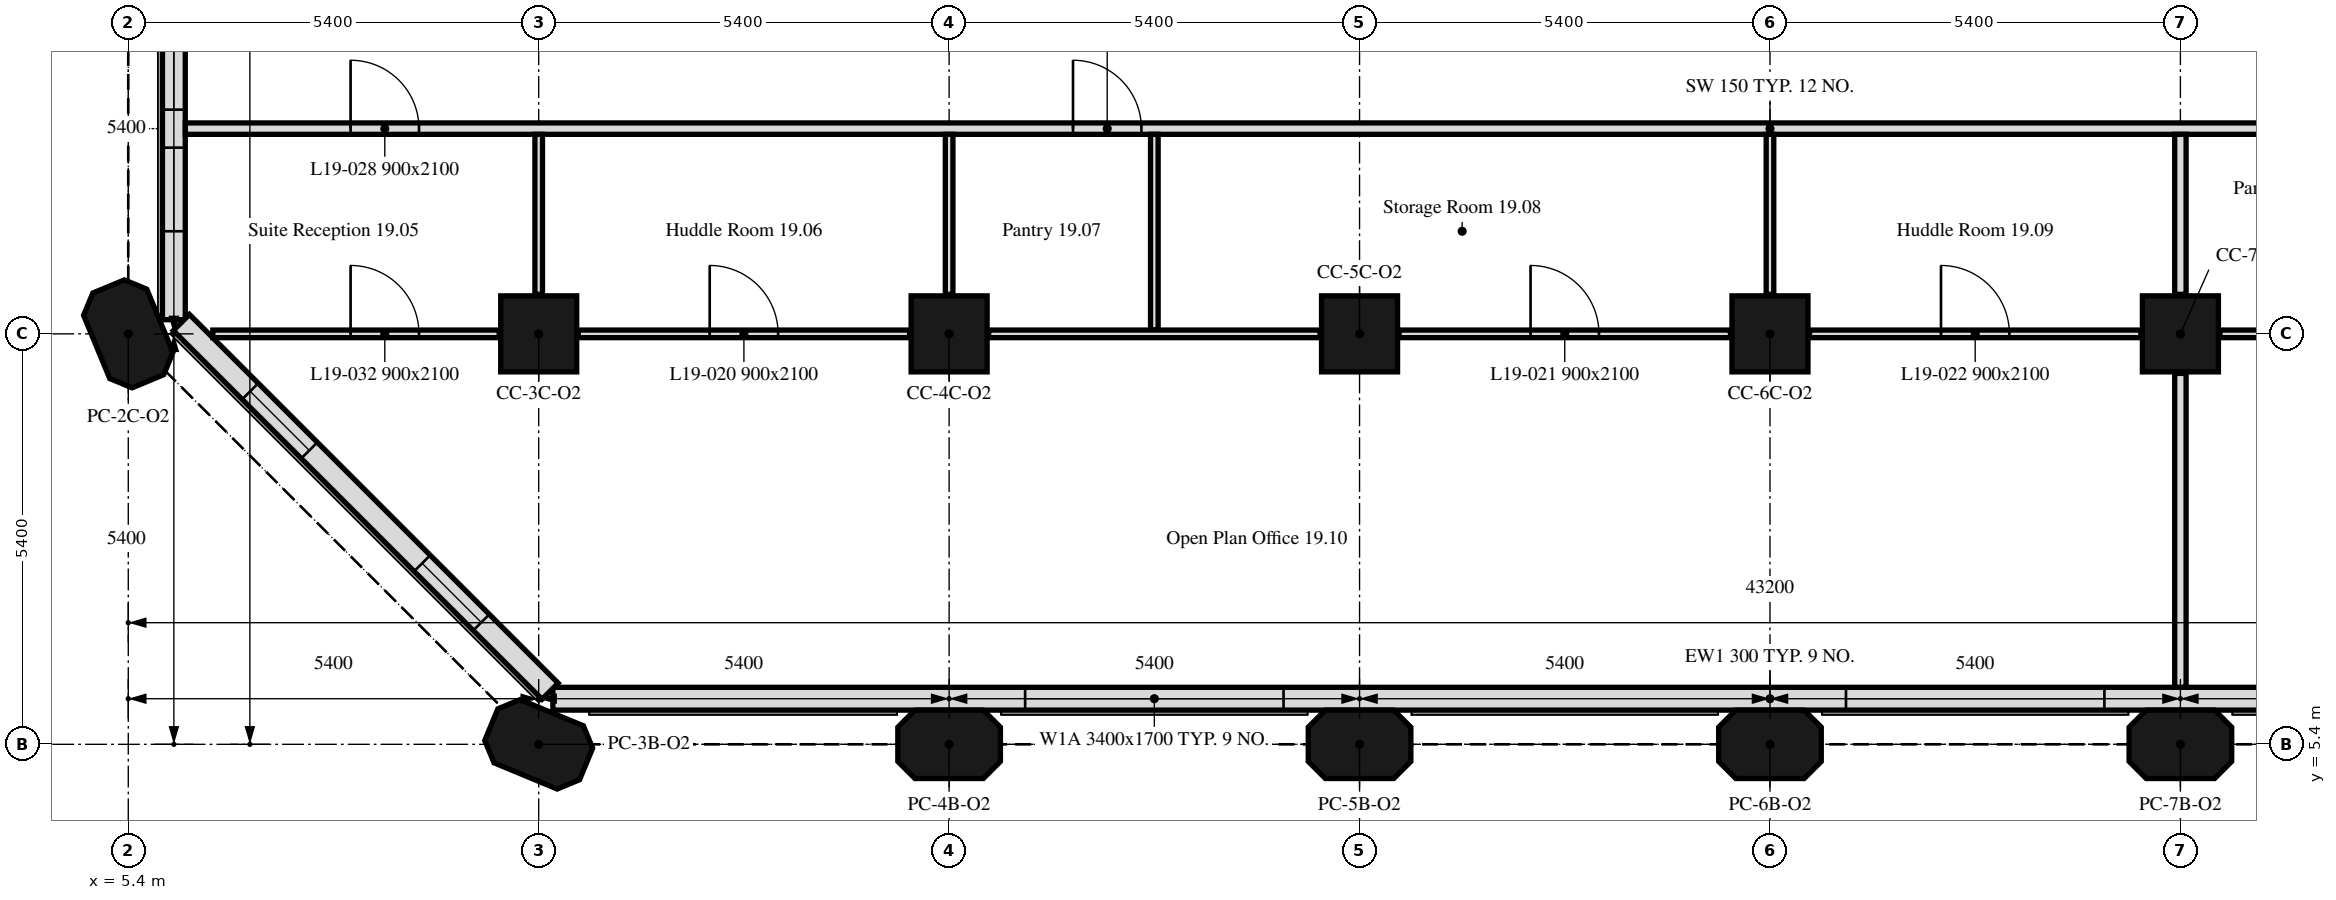
"""IFC4 building model, lengths in metres.
Left out: names, types, materials, properties, quantities, classifications, styles, units other than length and angle.
Written with IfcOpenShell. Run it as: python <this file> out.ifc"""

import sys

from ifc_helpers import new_model, si_unit, direction, frame, frame_2d, origin, origin_2d, place, context, subcontext, project, spatial, polyline, rectangle, outline, extrude, element, fill, save


model = new_model("IFC4")
c1 = context("Model", 3, precision=1e-05, world=origin(), true_north=direction((0.0, 1.0)))
c2 = subcontext(c1, "Body", "Model", "MODEL_VIEW")
j1 = project(units=[si_unit("LENGTHUNIT", "METRE"), si_unit("PLANEANGLEUNIT", "RADIAN")], contexts=[c1])
p1 = place(None, origin())
s1 = spatial("IfcSite", under=j1, at=p1, CompositionType="ELEMENT")
p2 = place(p1, origin())
s2 = spatial("IfcBuilding", under=s1, at=p2, CompositionType="ELEMENT")
p3 = place(p2, frame((0.0, 0.0, 84.0)))
s3 = spatial("IfcBuildingStorey", under=s2, at=p3, CompositionType="ELEMENT", Elevation=84.0)
for number, where, z_axis, x_axis in (
    (1, (10.8, 5.4, 0.0), (0.0, 0.0, 1.0), (-0.924, 0.383, 0.0)),
    (2, (16.2, 5.4, 0.0), (0.0, 0.0, 1.0), (1.0, 0.0, 0.0)),
    (3, (21.6, 5.4, 0.0), (0.0, 0.0, 1.0), (1.0, 0.0, 0.0)),
    (4, (27.0, 5.4, 0.0), (0.0, 0.0, 1.0), (1.0, 0.0, 0.0)),
    (5, (32.4, 5.4, 0.0), (0.0, 0.0, 1.0), (1.0, 0.0, 0.0)),
    (6, (5.4, 10.8, 0.0), (0.0, 0.0, 1.0), (-0.383, 0.924, 0.0)),
):
    element("IfcColumn", number, at=place(p3, frame(where, z_axis=z_axis, x_axis=x_axis)), inside=s3, PredefinedType="COLUMN", context=c2, shape_type="SweptSolid", body=[
        extrude(outline(polyline([(-0.45, -0.45), (0.45, -0.45), (0.675, -0.225), (0.675, 0.225), (0.45, 0.45), (-0.45, 0.45), (-0.675, 0.225), (-0.675, -0.225), (-0.45, -0.45)])), origin(), (0.0, 0.0, 1.0), 3.5),
    ])
for number, where, z_axis, x_axis in (
    (7, (10.8, 10.8, 0.0), (0.0, 0.0, 1.0), (1.0, 0.0, 0.0)),
    (8, (16.2, 10.8, 0.0), (0.0, 0.0, 1.0), (1.0, 0.0, 0.0)),
    (9, (21.6, 10.8, 0.0), (0.0, 0.0, 1.0), (1.0, 0.0, 0.0)),
    (10, (27.0, 10.8, 0.0), (0.0, 0.0, 1.0), (1.0, 0.0, 0.0)),
    (11, (32.4, 10.8, 0.0), (0.0, 0.0, 1.0), (1.0, 0.0, 0.0)),
):
    element("IfcColumn", number, at=place(p3, frame(where, z_axis=z_axis, x_axis=x_axis)), inside=s3, PredefinedType="COLUMN", context=c2, shape_type="SweptSolid", body=[
        extrude(rectangle(XDim=1.0, YDim=1.0, at=origin_2d()), origin(), (0.0, 0.0, 1.0), 3.5),
    ])
p4 = place(p3, frame((10.986, 6.0, 0.0), z_axis=(0.0, 0.0, 1.0), x_axis=(1.0, 0.0, 0.0)))
e12 = element("IfcWall", 12, at=p4, inside=s3, PredefinedType="SOLIDWALL", context=c2, shape_type="SweptSolid", body=[
    extrude(rectangle(XDim=32.027, YDim=0.3, at=frame_2d((16.014, 0.0))), origin(), (0.0, 0.0, 1.0), 3.5),
])
p5 = place(p4, frame((6.214, 0.0, 0.9)))
e13 = element("IfcOpeningElement", 13, at=p5, cuts=e12, PredefinedType="OPENING", context=c2, shape_type="SweptSolid", body=[
    extrude(rectangle(XDim=3.4, YDim=1.7, at=frame_2d((1.7, 0.85))), frame((0.0, 0.16, 0.0), z_axis=(0.0, -1.0, 0.0), x_axis=(1.0, 0.0, 0.0)), (0.0, 0.0, 1.0), 0.32),
])
p6 = place(p4, frame((17.014, 0.0, 0.9)))
e14 = element("IfcOpeningElement", 14, at=p6, cuts=e12, PredefinedType="OPENING", context=c2, shape_type="SweptSolid", body=[
    extrude(rectangle(XDim=3.4, YDim=1.7, at=frame_2d((1.7, 0.85))), frame((0.0, 0.16, 0.0), z_axis=(0.0, -1.0, 0.0), x_axis=(1.0, 0.0, 0.0)), (0.0, 0.0, 1.0), 0.32),
])
p7 = place(p4, frame((27.814, 0.0, 0.9)))
e15 = element("IfcOpeningElement", 15, at=p7, cuts=e12, PredefinedType="OPENING", context=c2, shape_type="SweptSolid", body=[
    extrude(rectangle(XDim=3.4, YDim=1.7, at=frame_2d((1.7, 0.85))), frame((0.0, 0.16, 0.0), z_axis=(0.0, -1.0, 0.0), x_axis=(1.0, 0.0, 0.0)), (0.0, 0.0, 1.0), 0.32),
])
p8 = place(p3, frame((6.0, 16.2, 0.0), z_axis=(0.0, 0.0, 1.0), x_axis=(0.0, -1.0, 0.0)))
e16 = element("IfcWall", 16, at=p8, inside=s3, PredefinedType="SOLIDWALL", context=c2, shape_type="SweptSolid", body=[
    extrude(rectangle(XDim=5.214, YDim=0.3, at=frame_2d((2.607, 0.0))), origin(), (0.0, 0.0, 1.0), 3.5),
])
p9 = place(p8, frame((1.35, 0.0, 0.9)))
e17 = element("IfcOpeningElement", 17, at=p9, cuts=e16, PredefinedType="OPENING", context=c2, shape_type="SweptSolid", body=[
    extrude(rectangle(XDim=1.1, YDim=1.7, at=frame_2d((0.55, 0.85))), frame((0.0, 0.16, 0.0), z_axis=(0.0, -1.0, 0.0), x_axis=(1.0, 0.0, 0.0)), (0.0, 0.0, 1.0), 0.32),
])
p10 = place(p8, frame((2.95, 0.0, 0.9)))
e18 = element("IfcOpeningElement", 18, at=p10, cuts=e16, PredefinedType="OPENING", context=c2, shape_type="SweptSolid", body=[
    extrude(rectangle(XDim=1.1, YDim=1.7, at=frame_2d((0.55, 0.85))), frame((0.0, 0.16, 0.0), z_axis=(0.0, -1.0, 0.0), x_axis=(1.0, 0.0, 0.0)), (0.0, 0.0, 1.0), 0.32),
])
p11 = place(p3, frame((6.099, 10.949, 0.0), z_axis=(0.0, 0.0, 1.0), x_axis=(0.707106781187, -0.707106781187, 0.0)))
e19 = element("IfcWall", 19, at=p11, inside=s3, PredefinedType="SOLIDWALL", context=c2, shape_type="SweptSolid", body=[
    extrude(rectangle(XDim=6.86, YDim=0.3, at=frame_2d((3.43, 0.0))), origin(), (0.0, 0.0, 1.0), 3.5),
])
p12 = place(p11, frame((1.28, 0.0, 0.9)))
e20 = element("IfcOpeningElement", 20, at=p12, cuts=e19, PredefinedType="OPENING", context=c2, shape_type="SweptSolid", body=[
    extrude(rectangle(XDim=1.1, YDim=1.7, at=frame_2d((0.55, 0.85))), frame((0.0, 0.16, 0.0), z_axis=(0.0, -1.0, 0.0), x_axis=(1.0, 0.0, 0.0)), (0.0, 0.0, 1.0), 0.32),
])
p13 = place(p11, frame((4.48, 0.0, 0.9)))
e21 = element("IfcOpeningElement", 21, at=p13, cuts=e19, PredefinedType="OPENING", context=c2, shape_type="SweptSolid", body=[
    extrude(rectangle(XDim=1.1, YDim=1.7, at=frame_2d((0.55, 0.85))), frame((0.0, 0.16, 0.0), z_axis=(0.0, -1.0, 0.0), x_axis=(1.0, 0.0, 0.0)), (0.0, 0.0, 1.0), 0.32),
])
p14 = place(p3, frame((6.151, 13.5, 0.0), z_axis=(0.0, 0.0, 1.0), x_axis=(1.0, 0.0, 0.0)))
e22 = element("IfcWall", 22, at=p14, inside=s3, PredefinedType="PARTITIONING", context=c2, shape_type="SweptSolid", body=[
    extrude(rectangle(XDim=41.698, YDim=0.15, at=frame_2d((20.849, 0.0))), origin(), (0.0, 0.0, 1.0), 3.5),
])
p15 = place(p14, frame((11.679, 0.0, 0.0)))
e23 = element("IfcOpeningElement", 23, at=p15, cuts=e22, PredefinedType="OPENING", context=c2, shape_type="SweptSolid", body=[
    extrude(rectangle(XDim=0.9, YDim=2.1, at=frame_2d((0.45, 1.05))), frame((0.0, 0.075, 0.0), z_axis=(0.0, -1.0, 0.0), x_axis=(1.0, 0.0, 0.0)), (0.0, 0.0, 1.0), 0.15),
])
p16 = place(p14, frame((27.879, 0.0, 0.0)))
e24 = element("IfcOpeningElement", 24, at=p16, cuts=e22, PredefinedType="OPENING", context=c2, shape_type="SweptSolid", body=[
    extrude(rectangle(XDim=0.9, YDim=2.1, at=frame_2d((0.45, 1.05))), frame((0.0, 0.075, 0.0), z_axis=(0.0, -1.0, 0.0), x_axis=(1.0, 0.0, 0.0)), (0.0, 0.0, 1.0), 0.15),
])
p17 = place(p14, frame((29.119, 0.0, 0.0)))
e25 = element("IfcOpeningElement", 25, at=p17, cuts=e22, PredefinedType="OPENING", context=c2, shape_type="SweptSolid", body=[
    extrude(rectangle(XDim=0.9, YDim=2.1, at=frame_2d((0.45, 1.05))), frame((0.0, 0.075, 0.0), z_axis=(0.0, -1.0, 0.0), x_axis=(1.0, 0.0, 0.0)), (0.0, 0.0, 1.0), 0.15),
])
p18 = place(p14, frame((33.279, 0.0, 0.0)))
e26 = element("IfcOpeningElement", 26, at=p18, cuts=e22, PredefinedType="OPENING", context=c2, shape_type="SweptSolid", body=[
    extrude(rectangle(XDim=0.9, YDim=2.1, at=frame_2d((0.45, 1.05))), frame((0.0, 0.075, 0.0), z_axis=(0.0, -1.0, 0.0), x_axis=(1.0, 0.0, 0.0)), (0.0, 0.0, 1.0), 0.15),
])
p19 = place(p14, frame((2.174, 0.0, 0.0)))
e27 = element("IfcOpeningElement", 27, at=p19, cuts=e22, PredefinedType="OPENING", context=c2, shape_type="SweptSolid", body=[
    extrude(rectangle(XDim=0.9, YDim=2.1, at=frame_2d((0.45, 1.05))), frame((0.0, 0.075, 0.0), z_axis=(0.0, -1.0, 0.0), x_axis=(1.0, 0.0, 0.0)), (0.0, 0.0, 1.0), 0.15),
])
p20 = place(p14, frame((34.519, 0.0, 0.0)))
e28 = element("IfcOpeningElement", 28, at=p20, cuts=e22, PredefinedType="OPENING", context=c2, shape_type="SweptSolid", body=[
    extrude(rectangle(XDim=0.9, YDim=2.1, at=frame_2d((0.45, 1.05))), frame((0.0, 0.075, 0.0), z_axis=(0.0, -1.0, 0.0), x_axis=(1.0, 0.0, 0.0)), (0.0, 0.0, 1.0), 0.15),
])
p21 = place(p3, frame((6.512, 10.8, 0.0), z_axis=(0.0, 0.0, 1.0), x_axis=(1.0, 0.0, 0.0)))
e29 = element("IfcWall", 29, at=p21, inside=s3, PredefinedType="PARTITIONING", context=c2, shape_type="SweptSolid", body=[
    extrude(rectangle(XDim=3.768, YDim=0.1, at=frame_2d((1.884, 0.0))), origin(), (0.0, 0.0, 1.0), 3.5),
])
p22 = place(p21, frame((1.813, 0.0, 0.0)))
e30 = element("IfcOpeningElement", 30, at=p22, cuts=e29, PredefinedType="OPENING", context=c2, shape_type="SweptSolid", body=[
    extrude(rectangle(XDim=0.9, YDim=2.1, at=frame_2d((0.45, 1.05))), frame((0.0, 0.05, 0.0), z_axis=(0.0, -1.0, 0.0), x_axis=(1.0, 0.0, 0.0)), (0.0, 0.0, 1.0), 0.1),
])
p23 = place(p3, frame((10.8, 11.32, 0.0), z_axis=(0.0, 0.0, 1.0), x_axis=(0.0, 1.0, 0.0)))
e31 = element("IfcWall", 31, at=p23, inside=s3, PredefinedType="PARTITIONING", context=c2, shape_type="SweptSolid", body=[
    extrude(rectangle(XDim=2.105, YDim=0.1, at=frame_2d((1.052, 0.0))), origin(), (0.0, 0.0, 1.0), 3.5),
])
p24 = place(p3, frame((11.32, 10.8, 0.0), z_axis=(0.0, 0.0, 1.0), x_axis=(1.0, 0.0, 0.0)))
e32 = element("IfcWall", 32, at=p24, inside=s3, PredefinedType="PARTITIONING", context=c2, shape_type="SweptSolid", body=[
    extrude(rectangle(XDim=4.36, YDim=0.1, at=frame_2d((2.18, 0.0))), origin(), (0.0, 0.0, 1.0), 3.5),
])
p25 = place(p24, frame((1.73, 0.0, 0.0)))
e33 = element("IfcOpeningElement", 33, at=p25, cuts=e32, PredefinedType="OPENING", context=c2, shape_type="SweptSolid", body=[
    extrude(rectangle(XDim=0.9, YDim=2.1, at=frame_2d((0.45, 1.05))), frame((0.0, 0.05, 0.0), z_axis=(0.0, -1.0, 0.0), x_axis=(1.0, 0.0, 0.0)), (0.0, 0.0, 1.0), 0.1),
])
p26 = place(p3, frame((16.2, 11.32, 0.0), z_axis=(0.0, 0.0, 1.0), x_axis=(0.0, 1.0, 0.0)))
e34 = element("IfcWall", 34, at=p26, inside=s3, PredefinedType="PARTITIONING", context=c2, shape_type="SweptSolid", body=[
    extrude(rectangle(XDim=2.105, YDim=0.1, at=frame_2d((1.052, 0.0))), origin(), (0.0, 0.0, 1.0), 3.5),
])
p27 = place(p3, frame((18.9, 10.85, 0.0), z_axis=(0.0, 0.0, 1.0), x_axis=(0.0, 1.0, 0.0)))
e35 = element("IfcWall", 35, at=p27, inside=s3, PredefinedType="PARTITIONING", context=c2, shape_type="SweptSolid", body=[
    extrude(rectangle(XDim=2.575, YDim=0.1, at=frame_2d((1.288, 0.0))), origin(), (0.0, 0.0, 1.0), 3.5),
])
p28 = place(p3, frame((16.72, 10.8, 0.0), z_axis=(0.0, 0.0, 1.0), x_axis=(1.0, 0.0, 0.0)))
e36 = element("IfcWall", 36, at=p28, inside=s3, PredefinedType="PARTITIONING", context=c2, shape_type="SweptSolid", body=[
    extrude(rectangle(XDim=4.36, YDim=0.1, at=frame_2d((2.18, 0.0))), origin(), (0.0, 0.0, 1.0), 3.5),
])
p29 = place(p3, frame((22.12, 10.8, 0.0), z_axis=(0.0, 0.0, 1.0), x_axis=(1.0, 0.0, 0.0)))
e37 = element("IfcWall", 37, at=p29, inside=s3, PredefinedType="PARTITIONING", context=c2, shape_type="SweptSolid", body=[
    extrude(rectangle(XDim=4.36, YDim=0.1, at=frame_2d((2.18, 0.0))), origin(), (0.0, 0.0, 1.0), 3.5),
])
p30 = place(p29, frame((1.73, 0.0, 0.0)))
e38 = element("IfcOpeningElement", 38, at=p30, cuts=e37, PredefinedType="OPENING", context=c2, shape_type="SweptSolid", body=[
    extrude(rectangle(XDim=0.9, YDim=2.1, at=frame_2d((0.45, 1.05))), frame((0.0, 0.05, 0.0), z_axis=(0.0, -1.0, 0.0), x_axis=(1.0, 0.0, 0.0)), (0.0, 0.0, 1.0), 0.1),
])
p31 = place(p3, frame((27.0, 11.32, 0.0), z_axis=(0.0, 0.0, 1.0), x_axis=(0.0, 1.0, 0.0)))
e39 = element("IfcWall", 39, at=p31, inside=s3, PredefinedType="PARTITIONING", context=c2, shape_type="SweptSolid", body=[
    extrude(rectangle(XDim=2.105, YDim=0.1, at=frame_2d((1.052, 0.0))), origin(), (0.0, 0.0, 1.0), 3.5),
])
p32 = place(p3, frame((27.52, 10.8, 0.0), z_axis=(0.0, 0.0, 1.0), x_axis=(1.0, 0.0, 0.0)))
e40 = element("IfcWall", 40, at=p32, inside=s3, PredefinedType="PARTITIONING", context=c2, shape_type="SweptSolid", body=[
    extrude(rectangle(XDim=4.36, YDim=0.1, at=frame_2d((2.18, 0.0))), origin(), (0.0, 0.0, 1.0), 3.5),
])
p33 = place(p32, frame((1.73, 0.0, 0.0)))
e41 = element("IfcOpeningElement", 41, at=p33, cuts=e40, PredefinedType="OPENING", context=c2, shape_type="SweptSolid", body=[
    extrude(rectangle(XDim=0.9, YDim=2.1, at=frame_2d((0.45, 1.05))), frame((0.0, 0.05, 0.0), z_axis=(0.0, -1.0, 0.0), x_axis=(1.0, 0.0, 0.0)), (0.0, 0.0, 1.0), 0.1),
])
p34 = place(p3, frame((32.4, 11.32, 0.0), z_axis=(0.0, 0.0, 1.0), x_axis=(0.0, 1.0, 0.0)))
e42 = element("IfcWall", 42, at=p34, inside=s3, PredefinedType="PARTITIONING", context=c2, shape_type="SweptSolid", body=[
    extrude(rectangle(XDim=2.105, YDim=0.15, at=frame_2d((1.052, 0.0))), origin(), (0.0, 0.0, 1.0), 3.5),
])
p35 = place(p3, frame((32.4, 6.151, 0.0), z_axis=(0.0, 0.0, 1.0), x_axis=(0.0, 1.0, 0.0)))
e43 = element("IfcWall", 43, at=p35, inside=s3, PredefinedType="PARTITIONING", context=c2, shape_type="SweptSolid", body=[
    extrude(rectangle(XDim=4.129, YDim=0.15, at=frame_2d((2.064, 0.0))), origin(), (0.0, 0.0, 1.0), 3.5),
])
p36 = place(p3, frame((32.92, 10.8, 0.0), z_axis=(0.0, 0.0, 1.0), x_axis=(1.0, 0.0, 0.0)))
e44 = element("IfcWall", 44, at=p36, inside=s3, PredefinedType="PARTITIONING", context=c2, shape_type="SweptSolid", body=[
    extrude(rectangle(XDim=4.36, YDim=0.1, at=frame_2d((2.18, 0.0))), origin(), (0.0, 0.0, 1.0), 3.5),
])
p37 = place(p5, origin())
e45 = element("IfcWindow", 45, at=p37, inside=s3, PartitioningType="SINGLE_PANEL", PredefinedType="WINDOW", context=c2, shape_type="SweptSolid", body=[
    extrude(rectangle(XDim=3.4, YDim=1.7, at=frame_2d((1.7, 0.85))), frame((0.0, 0.03, 0.0), z_axis=(0.0, -1.0, 0.0), x_axis=(1.0, 0.0, 0.0)), (0.0, 0.0, 1.0), 0.06),
])
fill(e13, e45)
p38 = place(p6, origin())
e46 = element("IfcWindow", 46, at=p38, inside=s3, PartitioningType="SINGLE_PANEL", PredefinedType="WINDOW", context=c2, shape_type="SweptSolid", body=[
    extrude(rectangle(XDim=3.4, YDim=1.7, at=frame_2d((1.7, 0.85))), frame((0.0, 0.03, 0.0), z_axis=(0.0, -1.0, 0.0), x_axis=(1.0, 0.0, 0.0)), (0.0, 0.0, 1.0), 0.06),
])
fill(e14, e46)
p39 = place(p9, origin())
e47 = element("IfcWindow", 47, at=p39, inside=s3, PartitioningType="SINGLE_PANEL", PredefinedType="WINDOW", context=c2, shape_type="SweptSolid", body=[
    extrude(rectangle(XDim=1.1, YDim=1.7, at=frame_2d((0.55, 0.85))), frame((0.0, 0.03, 0.0), z_axis=(0.0, -1.0, 0.0), x_axis=(1.0, 0.0, 0.0)), (0.0, 0.0, 1.0), 0.06),
])
fill(e17, e47)
p40 = place(p10, origin())
e48 = element("IfcWindow", 48, at=p40, inside=s3, PartitioningType="SINGLE_PANEL", PredefinedType="WINDOW", context=c2, shape_type="SweptSolid", body=[
    extrude(rectangle(XDim=1.1, YDim=1.7, at=frame_2d((0.55, 0.85))), frame((0.0, 0.03, 0.0), z_axis=(0.0, -1.0, 0.0), x_axis=(1.0, 0.0, 0.0)), (0.0, 0.0, 1.0), 0.06),
])
fill(e18, e48)
p41 = place(p12, origin())
e49 = element("IfcWindow", 49, at=p41, inside=s3, PartitioningType="SINGLE_PANEL", PredefinedType="WINDOW", context=c2, shape_type="SweptSolid", body=[
    extrude(rectangle(XDim=1.1, YDim=1.7, at=frame_2d((0.55, 0.85))), frame((0.0, 0.03, 0.0), z_axis=(0.0, -1.0, 0.0), x_axis=(1.0, 0.0, 0.0)), (0.0, 0.0, 1.0), 0.06),
])
fill(e20, e49)
p42 = place(p13, origin())
e50 = element("IfcWindow", 50, at=p42, inside=s3, PartitioningType="SINGLE_PANEL", PredefinedType="WINDOW", context=c2, shape_type="SweptSolid", body=[
    extrude(rectangle(XDim=1.1, YDim=1.7, at=frame_2d((0.55, 0.85))), frame((0.0, 0.03, 0.0), z_axis=(0.0, -1.0, 0.0), x_axis=(1.0, 0.0, 0.0)), (0.0, 0.0, 1.0), 0.06),
])
fill(e21, e50)
p43 = place(p15, origin())
e51 = element("IfcDoor", 51, at=p43, inside=s3, OperationType="SINGLE_SWING_LEFT", PredefinedType="DOOR", context=c2, shape_type="SweptSolid", body=[
    extrude(rectangle(XDim=0.9, YDim=2.1, at=frame_2d((0.45, 1.05))), frame((0.0, 0.025, 0.0), z_axis=(0.0, -1.0, 0.0), x_axis=(1.0, 0.0, 0.0)), (0.0, 0.0, 1.0), 0.05),
])
fill(e23, e51)
p44 = place(p25, origin())
e52 = element("IfcDoor", 52, at=p44, inside=s3, OperationType="SINGLE_SWING_RIGHT", PredefinedType="DOOR", context=c2, shape_type="SweptSolid", body=[
    extrude(rectangle(XDim=0.9, YDim=2.1, at=frame_2d((0.45, 1.05))), frame((0.0, 0.025, 0.0), z_axis=(0.0, -1.0, 0.0), x_axis=(1.0, 0.0, 0.0)), (0.0, 0.0, 1.0), 0.05),
])
fill(e33, e52)
p45 = place(p30, origin())
e53 = element("IfcDoor", 53, at=p45, inside=s3, OperationType="SINGLE_SWING_LEFT", PredefinedType="DOOR", context=c2, shape_type="SweptSolid", body=[
    extrude(rectangle(XDim=0.9, YDim=2.1, at=frame_2d((0.45, 1.05))), frame((0.0, 0.025, 0.0), z_axis=(0.0, -1.0, 0.0), x_axis=(1.0, 0.0, 0.0)), (0.0, 0.0, 1.0), 0.05),
])
fill(e38, e53)
p46 = place(p33, origin())
e54 = element("IfcDoor", 54, at=p46, inside=s3, OperationType="SINGLE_SWING_RIGHT", PredefinedType="DOOR", context=c2, shape_type="SweptSolid", body=[
    extrude(rectangle(XDim=0.9, YDim=2.1, at=frame_2d((0.45, 1.05))), frame((0.0, 0.025, 0.0), z_axis=(0.0, -1.0, 0.0), x_axis=(1.0, 0.0, 0.0)), (0.0, 0.0, 1.0), 0.05),
])
fill(e41, e54)
p47 = place(p19, origin())
e55 = element("IfcDoor", 55, at=p47, inside=s3, OperationType="SINGLE_SWING_LEFT", PredefinedType="DOOR", context=c2, shape_type="SweptSolid", body=[
    extrude(rectangle(XDim=0.9, YDim=2.1, at=frame_2d((0.45, 1.05))), frame((0.0, 0.025, 0.0), z_axis=(0.0, -1.0, 0.0), x_axis=(1.0, 0.0, 0.0)), (0.0, 0.0, 1.0), 0.05),
])
fill(e27, e55)
p48 = place(p22, origin())
e56 = element("IfcDoor", 56, at=p48, inside=s3, OperationType="SINGLE_SWING_LEFT", PredefinedType="DOOR", context=c2, shape_type="SweptSolid", body=[
    extrude(rectangle(XDim=0.9, YDim=2.1, at=frame_2d((0.45, 1.05))), frame((0.0, 0.025, 0.0), z_axis=(0.0, -1.0, 0.0), x_axis=(1.0, 0.0, 0.0)), (0.0, 0.0, 1.0), 0.05),
])
fill(e30, e56)
save(model, sys.argv[1])
